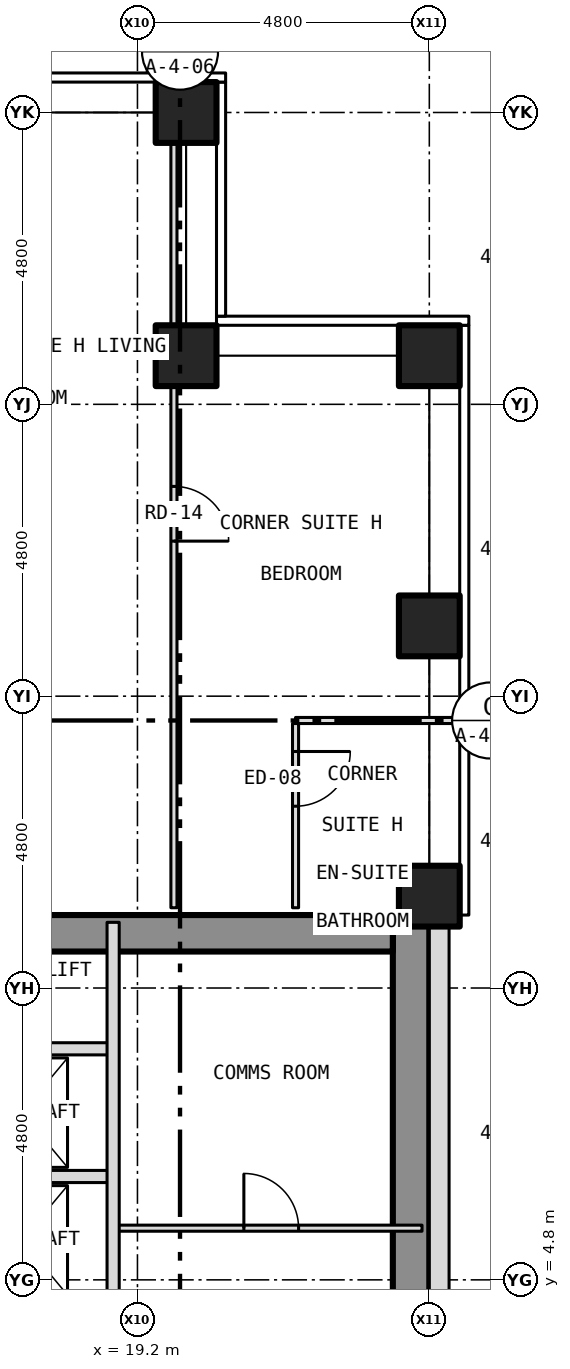
"""IFC4 building model, lengths in metres.
Left out: names, types, materials, properties, quantities, classifications, styles, units other than length and angle.
Written with IfcOpenShell. Run it as: python <this file> out.ifc"""

import sys

from ifc_helpers import new_model, si_unit, direction, frame, frame_2d, origin, origin_2d, place, context, subcontext, project, spatial, rectangle, hollow_rectangle, extrude, element, fill, save


model = new_model("IFC4")
c1 = context("Model", 3, precision=1e-05, world=origin(), true_north=direction((0.0, 1.0)))
c2 = subcontext(c1, "Body", "Model", "MODEL_VIEW")
j1 = project(units=[si_unit("LENGTHUNIT", "METRE"), si_unit("PLANEANGLEUNIT", "RADIAN")], contexts=[c1])
p1 = place(None, origin())
s1 = spatial("IfcSite", under=j1, at=p1, CompositionType="ELEMENT")
p2 = place(p1, origin())
s2 = spatial("IfcBuilding", under=s1, at=p2, CompositionType="ELEMENT")
p3 = place(p2, frame((0.0, 0.0, 70.5)))
s3 = spatial("IfcBuildingStorey", under=s2, at=p3, CompositionType="ELEMENT", Elevation=70.5)
for number, where, z_axis, x_axis in (
    (1, (20.0, 24.0, -0.15), (0.0, 0.0, 1.0), (1.0, 0.0, 0.0)),
    (2, (24.0, 11.111, -0.15), (0.0, 0.0, 1.0), (1.0, 0.0, 0.0)),
    (3, (24.0, 15.556, -0.15), (0.0, 0.0, 1.0), (1.0, 0.0, 0.0)),
    (4, (24.0, 20.0, -0.15), (0.0, 0.0, 1.0), (1.0, 0.0, 0.0)),
    (5, (20.0, 20.0, -0.15), (0.0, 0.0, 1.0), (1.0, 0.0, 0.0)),
):
    element("IfcColumn", number, at=place(p3, frame(where, z_axis=z_axis, x_axis=x_axis)), inside=s3, PredefinedType="COLUMN", context=c2, shape_type="SweptSolid", body=[
        extrude(hollow_rectangle(XDim=1.0, YDim=1.0, WallThickness=0.06, at=origin_2d()), origin(), (0.0, 0.0, 1.0), 3.5),
    ])
p4 = place(p3, frame((23.7, -10.8, 0.0), z_axis=(0.0, 0.0, 1.0), x_axis=(0.0, 1.0, 0.0)))
e6 = element("IfcWall", 6, at=p4, inside=s3, PredefinedType="SHEAR", context=c2, shape_type="SweptSolid", body=[
    extrude(rectangle(XDim=21.6, YDim=0.6, at=frame_2d((10.8, 0.0))), origin(), (0.0, 0.0, 1.0), 3.25),
])
p5 = place(p3, frame((16.4, 10.5, 0.0), z_axis=(0.0, 0.0, 1.0), x_axis=(1.0, 0.0, 0.0)))
e7 = element("IfcWall", 7, at=p5, inside=s3, PredefinedType="SHEAR", context=c2, shape_type="SweptSolid", body=[
    extrude(rectangle(XDim=7.0, YDim=0.6, at=frame_2d((3.5, 0.0))), origin(), (0.0, 0.0, 1.0), 3.25),
])
p6 = place(p3, frame((24.163, -10.8, 0.0), z_axis=(0.0, 0.0, 1.0), x_axis=(0.0, 1.0, 0.0)))
e8 = element("IfcWall", 8, at=p6, inside=s3, PredefinedType="SOLIDWALL", context=c2, shape_type="SweptSolid", body=[
    extrude(rectangle(XDim=21.6, YDim=0.325, at=frame_2d((10.8, 0.0))), origin(), (0.0, 0.0, 1.0), 3.5),
])
p7 = place(p6, frame((2.95, 0.0, 1.0)))
e9 = element("IfcOpeningElement", 9, at=p7, cuts=e8, PredefinedType="OPENING", context=c2, shape_type="SweptSolid", body=[
    extrude(rectangle(XDim=0.6, YDim=1.5, at=frame_2d((0.3, 0.75))), frame((0.0, 0.175, 0.0), z_axis=(0.0, -1.0, 0.0), x_axis=(1.0, 0.0, 0.0)), (0.0, 0.0, 1.0), 0.349),
])
p8 = place(p3, frame((18.8, 5.65, 0.0), z_axis=(0.0, 0.0, 1.0), x_axis=(1.0, 0.0, 0.0)))
e10 = element("IfcWall", 10, at=p8, inside=s3, PredefinedType="PARTITIONING", context=c2, shape_type="SweptSolid", body=[
    extrude(rectangle(XDim=5.08, YDim=0.1, at=frame_2d((2.54, 0.0))), origin(), (0.0, 0.0, 1.0), 3.25),
])
p9 = place(p8, frame((2.15, 0.0, 0.0)))
e11 = element("IfcOpeningElement", 11, at=p9, cuts=e10, PredefinedType="OPENING", context=c2, shape_type="SweptSolid", body=[
    extrude(rectangle(XDim=0.9, YDim=2.1, at=frame_2d((0.45, 1.05))), frame((0.0, 0.062, 0.0), z_axis=(0.0, -1.0, 0.0), x_axis=(1.0, 0.0, 0.0)), (0.0, 0.0, 1.0), 0.124),
])
for number, where, z_axis, x_axis in (
    (12, (15.92, 6.5, 0.0), (0.0, 0.0, 1.0), (1.0, 0.0, 0.0)),
    (13, (15.92, 8.6, 0.0), (0.0, 0.0, 1.0), (1.0, 0.0, 0.0)),
):
    element("IfcWall", number, at=place(p3, frame(where, z_axis=z_axis, x_axis=x_axis)), inside=s3, PredefinedType="PARTITIONING", context=c2, shape_type="SweptSolid", body=[
        extrude(rectangle(XDim=2.88, YDim=0.2, at=frame_2d((1.44, 0.0))), origin(), (0.0, 0.0, 1.0), 3.25),
    ])
p10 = place(p3, frame((21.8, 14.0, 0.0), z_axis=(0.0, 0.0, 1.0), x_axis=(1.0, 0.0, 0.0)))
e14 = element("IfcWall", 14, at=p10, inside=s3, PredefinedType="PARTITIONING", context=c2, shape_type="SweptSolid", body=[
    extrude(rectangle(XDim=2.73, YDim=0.1, at=frame_2d((1.365, 0.0))), origin(), (0.0, 0.0, 1.0), 3.35),
])
p11 = place(p3, frame((18.8, -1.8, 0.0), z_axis=(0.0, 0.0, 1.0), x_axis=(0.0, 1.0, 0.0)))
e15 = element("IfcWall", 15, at=p11, inside=s3, PredefinedType="PARTITIONING", context=c2, shape_type="SweptSolid", body=[
    extrude(rectangle(XDim=12.48, YDim=0.2, at=frame_2d((6.24, 0.0))), origin(), (0.0, 0.0, 1.0), 3.25),
])
p12 = place(p3, frame((19.8, 10.92, 0.0), z_axis=(0.0, 0.0, 1.0), x_axis=(0.0, 1.0, 0.0)))
e16 = element("IfcWall", 16, at=p12, inside=s3, PredefinedType="PARTITIONING", context=c2, shape_type="SweptSolid", body=[
    extrude(rectangle(XDim=12.96, YDim=0.1, at=frame_2d((6.48, 0.0))), origin(), (0.0, 0.0, 1.0), 3.35),
])
p13 = place(p12, frame((6.03, 0.0, 0.0)))
e17 = element("IfcOpeningElement", 17, at=p13, cuts=e16, PredefinedType="OPENING", context=c2, shape_type="SweptSolid", body=[
    extrude(rectangle(XDim=0.9, YDim=2.1, at=frame_2d((0.45, 1.05))), frame((0.0, 0.062, 0.0), z_axis=(0.0, -1.0, 0.0), x_axis=(1.0, 0.0, 0.0)), (0.0, 0.0, 1.0), 0.124),
])
p14 = place(p3, frame((21.8, 10.92, 0.0), z_axis=(0.0, 0.0, 1.0), x_axis=(0.0, 1.0, 0.0)))
e18 = element("IfcWall", 18, at=p14, inside=s3, PredefinedType="PARTITIONING", context=c2, shape_type="SweptSolid", body=[
    extrude(rectangle(XDim=3.03, YDim=0.1, at=frame_2d((1.515, 0.0))), origin(), (0.0, 0.0, 1.0), 3.35),
])
p15 = place(p14, frame((1.67, 0.0, 0.0)))
e19 = element("IfcOpeningElement", 19, at=p15, cuts=e18, PredefinedType="OPENING", context=c2, shape_type="SweptSolid", body=[
    extrude(rectangle(XDim=0.9, YDim=2.1, at=frame_2d((0.45, 1.05))), frame((0.0, 0.062, 0.0), z_axis=(0.0, -1.0, 0.0), x_axis=(1.0, 0.0, 0.0)), (0.0, 0.0, 1.0), 0.124),
])
p16 = place(p9, origin())
e20 = element("IfcDoor", 20, at=p16, inside=s3, OperationType="SINGLE_SWING_LEFT", PredefinedType="DOOR", context=c2, shape_type="SweptSolid", body=[
    extrude(rectangle(XDim=0.9, YDim=2.1, at=frame_2d((0.45, 1.05))), frame((0.0, 0.025, 0.0), z_axis=(0.0, -1.0, 0.0), x_axis=(1.0, 0.0, 0.0)), (0.0, 0.0, 1.0), 0.05),
])
fill(e11, e20)
p17 = place(p13, origin())
e21 = element("IfcDoor", 21, at=p17, inside=s3, OperationType="SINGLE_SWING_LEFT", PredefinedType="DOOR", context=c2, shape_type="SweptSolid", body=[
    extrude(rectangle(XDim=0.9, YDim=2.1, at=frame_2d((0.45, 1.05))), frame((0.0, 0.025, 0.0), z_axis=(0.0, -1.0, 0.0), x_axis=(1.0, 0.0, 0.0)), (0.0, 0.0, 1.0), 0.05),
])
fill(e17, e21)
p18 = place(p15, origin())
e22 = element("IfcDoor", 22, at=p18, inside=s3, OperationType="SINGLE_SWING_RIGHT", PredefinedType="DOOR", context=c2, shape_type="SweptSolid", body=[
    extrude(rectangle(XDim=0.9, YDim=2.1, at=frame_2d((0.45, 1.05))), frame((0.0, 0.025, 0.0), z_axis=(0.0, -1.0, 0.0), x_axis=(1.0, 0.0, 0.0)), (0.0, 0.0, 1.0), 0.05),
])
fill(e19, e22)
save(model, sys.argv[1])
